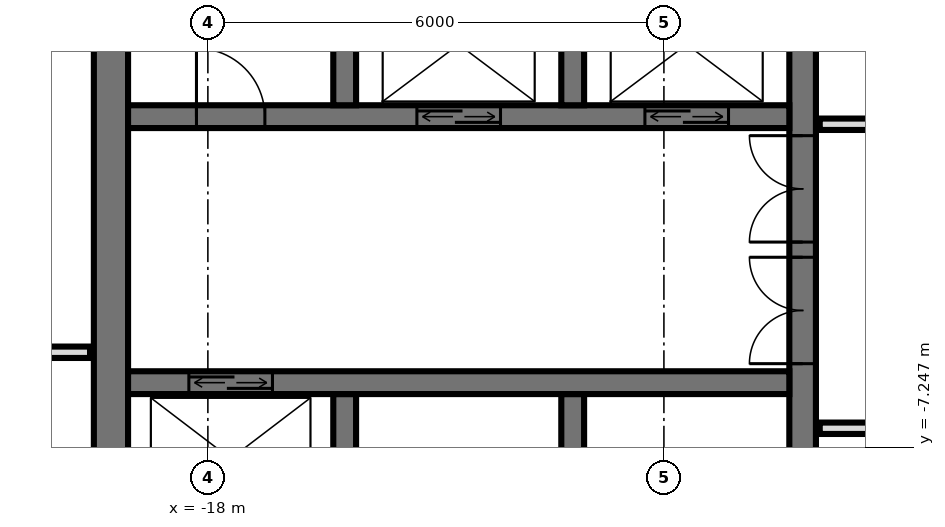
"""IFC4 building model, lengths in metres.
Left out: names, types, materials, properties, quantities, classifications, styles, units other than length and angle.
Written with IfcOpenShell. Run it as: python <this file> out.ifc"""

import sys

from ifc_helpers import new_model, si_unit, direction, frame, frame_2d, origin, place, context, subcontext, project, spatial, rectangle, extrude, element, fill, save


model = new_model("IFC4")
c1 = context("Model", 3, precision=1e-05, world=origin(), true_north=direction((0.0, 1.0)))
c2 = subcontext(c1, "Body", "Model", "MODEL_VIEW")
j1 = project(units=[si_unit("LENGTHUNIT", "METRE"), si_unit("PLANEANGLEUNIT", "RADIAN")], contexts=[c1])
p1 = place(None, origin())
s1 = spatial("IfcSite", under=j1, at=p1, CompositionType="ELEMENT")
p2 = place(p1, origin())
s2 = spatial("IfcBuilding", under=s1, at=p2, CompositionType="ELEMENT")
p3 = place(p2, frame((0.0, 0.0, 273.6)))
s3 = spatial("IfcBuildingStorey", under=s2, at=p3, CompositionType="ELEMENT", Elevation=273.6)
p4 = place(p3, frame((-10.175, -14.55, 0.0), z_axis=(0.0, 0.0, 1.0), x_axis=(0.0, 1.0, 0.0)))
e1 = element("IfcWall", 1, at=p4, inside=s3, PredefinedType="SHEAR", context=c2, shape_type="SweptSolid", body=[
    extrude(rectangle(XDim=14.1, YDim=0.35, at=frame_2d((7.05, 0.0))), origin(), (0.0, 0.0, 1.0), 3.5),
])
p5 = place(p4, frame((8.4, 0.0, 0.0)))
e2 = element("IfcOpeningElement", 2, at=p5, cuts=e1, PredefinedType="OPENING", context=c2, shape_type="SweptSolid", body=[
    extrude(rectangle(XDim=1.4, YDim=2.4, at=frame_2d((0.7, 1.2))), frame((0.0, 0.185, 0.0), z_axis=(0.0, -1.0, 0.0), x_axis=(1.0, 0.0, 0.0)), (0.0, 0.0, 1.0), 0.37),
])
p6 = place(p4, frame((10.0, 0.0, 0.0)))
e3 = element("IfcOpeningElement", 3, at=p6, cuts=e1, PredefinedType="OPENING", context=c2, shape_type="SweptSolid", body=[
    extrude(rectangle(XDim=1.4, YDim=2.4, at=frame_2d((0.7, 1.2))), frame((0.0, 0.185, 0.0), z_axis=(0.0, -1.0, 0.0), x_axis=(1.0, 0.0, 0.0)), (0.0, 0.0, 1.0), 0.37),
])
p7 = place(p4, frame((4.0, 0.0, 0.0)))
e4 = element("IfcOpeningElement", 4, at=p7, cuts=e1, PredefinedType="OPENING", context=c2, shape_type="SweptSolid", body=[
    extrude(rectangle(XDim=1.2, YDim=2.1, at=frame_2d((0.6, 1.05))), frame((0.0, 0.185, 0.0), z_axis=(0.0, -1.0, 0.0), x_axis=(1.0, 0.0, 0.0)), (0.0, 0.0, 1.0), 0.37),
])
p8 = place(p3, frame((-19.275, -14.55, 0.0), z_axis=(0.0, 0.0, 1.0), x_axis=(0.0, 1.0, 0.0)))
e5 = element("IfcWall", 5, at=p8, inside=s3, PredefinedType="SHEAR", context=c2, shape_type="SweptSolid", body=[
    extrude(rectangle(XDim=14.1, YDim=0.45, at=frame_2d((7.05, 0.0))), origin(), (0.0, 0.0, 1.0), 3.5),
])
p9 = place(p3, frame((-19.05, -2.9, 0.0), z_axis=(0.0, 0.0, 1.0), x_axis=(1.0, 0.0, 0.0)))
e6 = element("IfcWall", 6, at=p9, inside=s3, PredefinedType="SHEAR", context=c2, shape_type="SweptSolid", body=[
    extrude(rectangle(XDim=8.7, YDim=0.3, at=frame_2d((4.35, 0.0))), origin(), (0.0, 0.0, 1.0), 3.5),
])
p10 = place(p9, frame((6.8, 0.0, 0.0)))
e7 = element("IfcOpeningElement", 7, at=p10, cuts=e6, PredefinedType="OPENING", context=c2, shape_type="SweptSolid", body=[
    extrude(rectangle(XDim=1.1, YDim=2.1, at=frame_2d((0.55, 1.05))), frame((0.0, 0.16, 0.0), z_axis=(0.0, -1.0, 0.0), x_axis=(1.0, 0.0, 0.0)), (0.0, 0.0, 1.0), 0.32),
])
p11 = place(p9, frame((3.8, 0.0, 0.0)))
e8 = element("IfcOpeningElement", 8, at=p11, cuts=e6, PredefinedType="OPENING", context=c2, shape_type="SweptSolid", body=[
    extrude(rectangle(XDim=1.1, YDim=2.1, at=frame_2d((0.55, 1.05))), frame((0.0, 0.16, 0.0), z_axis=(0.0, -1.0, 0.0), x_axis=(1.0, 0.0, 0.0)), (0.0, 0.0, 1.0), 0.32),
])
p12 = place(p9, frame((0.9, 0.0, 0.0)))
e9 = element("IfcOpeningElement", 9, at=p12, cuts=e6, PredefinedType="OPENING", context=c2, shape_type="SweptSolid", body=[
    extrude(rectangle(XDim=0.9, YDim=2.1, at=frame_2d((0.45, 1.05))), frame((0.0, 0.16, 0.0), z_axis=(0.0, -1.0, 0.0), x_axis=(1.0, 0.0, 0.0)), (0.0, 0.0, 1.0), 0.32),
])
p13 = place(p3, frame((-19.05, -6.4, 0.0), z_axis=(0.0, 0.0, 1.0), x_axis=(1.0, 0.0, 0.0)))
e10 = element("IfcWall", 10, at=p13, inside=s3, PredefinedType="SHEAR", context=c2, shape_type="SweptSolid", body=[
    extrude(rectangle(XDim=8.7, YDim=0.3, at=frame_2d((4.35, 0.0))), origin(), (0.0, 0.0, 1.0), 3.5),
])
p14 = place(p13, frame((0.8, 0.0, 0.0)))
e11 = element("IfcOpeningElement", 11, at=p14, cuts=e10, PredefinedType="OPENING", context=c2, shape_type="SweptSolid", body=[
    extrude(rectangle(XDim=1.1, YDim=2.1, at=frame_2d((0.55, 1.05))), frame((0.0, 0.16, 0.0), z_axis=(0.0, -1.0, 0.0), x_axis=(1.0, 0.0, 0.0)), (0.0, 0.0, 1.0), 0.32),
])
for number, where, z_axis, x_axis in (
    (12, (-13.2, -2.75, 0.0), (0.0, 0.0, 1.0), (0.0, 1.0, 0.0)),
    (13, (-13.2, -8.85, 0.0), (0.0, 0.0, 1.0), (0.0, 1.0, 0.0)),
    (14, (-16.2, -2.75, 0.0), (0.0, 0.0, 1.0), (0.0, 1.0, 0.0)),
    (15, (-16.2, -8.85, 0.0), (0.0, 0.0, 1.0), (0.0, 1.0, 0.0)),
):
    element("IfcWall", number, at=place(p3, frame(where, z_axis=z_axis, x_axis=x_axis)), inside=s3, PredefinedType="SHEAR", context=c2, shape_type="SweptSolid", body=[
        extrude(rectangle(XDim=2.3, YDim=0.3, at=frame_2d((1.15, 0.0))), origin(), (0.0, 0.0, 1.0), 3.5),
    ])
p15 = place(p3, frame((-9.95, -7.0, 0.0), z_axis=(0.0, 0.0, 1.0), x_axis=(1.0, 0.0, 0.0)))
e16 = element("IfcWall", 16, at=p15, inside=s3, PredefinedType="PARTITIONING", context=c2, shape_type="SweptSolid", body=[
    extrude(rectangle(XDim=19.9, YDim=0.15, at=frame_2d((9.95, 0.0))), origin(), (0.0, 0.0, 1.0), 3.22),
])
p16 = place(p15, frame((9.45, 0.0, 0.0)))
e17 = element("IfcOpeningElement", 17, at=p16, cuts=e16, PredefinedType="OPENING", context=c2, shape_type="SweptSolid", body=[
    extrude(rectangle(XDim=1.0, YDim=2.1, at=frame_2d((0.5, 1.05))), frame((0.0, 0.085, 0.0), z_axis=(0.0, -1.0, 0.0), x_axis=(1.0, 0.0, 0.0)), (0.0, 0.0, 1.0), 0.17),
])
p17 = place(p15, frame((3.45, 0.0, 0.0)))
e18 = element("IfcOpeningElement", 18, at=p17, cuts=e16, PredefinedType="OPENING", context=c2, shape_type="SweptSolid", body=[
    extrude(rectangle(XDim=1.0, YDim=2.1, at=frame_2d((0.5, 1.05))), frame((0.0, 0.085, 0.0), z_axis=(0.0, -1.0, 0.0), x_axis=(1.0, 0.0, 0.0)), (0.0, 0.0, 1.0), 0.17),
])
p18 = place(p3, frame((-22.92, -6.0, 0.0), z_axis=(0.0, 0.0, 1.0), x_axis=(1.0, 0.0, 0.0)))
e19 = element("IfcWall", 19, at=p18, inside=s3, PredefinedType="PARTITIONING", context=c2, shape_type="SweptSolid", body=[
    extrude(rectangle(XDim=3.37, YDim=0.15, at=frame_2d((1.685, 0.0))), origin(), (0.0, 0.0, 1.0), 3.22),
])
p19 = place(p18, frame((1.17, 0.0, 0.0)))
e20 = element("IfcOpeningElement", 20, at=p19, cuts=e19, PredefinedType="OPENING", context=c2, shape_type="SweptSolid", body=[
    extrude(rectangle(XDim=0.9, YDim=2.1, at=frame_2d((0.45, 1.05))), frame((0.0, 0.085, 0.0), z_axis=(0.0, -1.0, 0.0), x_axis=(1.0, 0.0, 0.0)), (0.0, 0.0, 1.0), 0.17),
])
p20 = place(p3, frame((-9.95, -3.0, 0.0), z_axis=(0.0, 0.0, 1.0), x_axis=(1.0, 0.0, 0.0)))
e21 = element("IfcWall", 21, at=p20, inside=s3, PredefinedType="PARTITIONING", context=c2, shape_type="SweptSolid", body=[
    extrude(rectangle(XDim=19.9, YDim=0.15, at=frame_2d((9.95, 0.0))), origin(), (0.0, 0.0, 1.0), 3.22),
])
p21 = place(p20, frame((4.2, 0.0, 0.0)))
e22 = element("IfcOpeningElement", 22, at=p21, cuts=e21, PredefinedType="OPENING", context=c2, shape_type="SweptSolid", body=[
    extrude(rectangle(XDim=1.0, YDim=2.1, at=frame_2d((0.5, 1.05))), frame((0.0, 0.085, 0.0), z_axis=(0.0, -1.0, 0.0), x_axis=(1.0, 0.0, 0.0)), (0.0, 0.0, 1.0), 0.17),
])
p22 = place(p20, frame((11.45, 0.0, 0.0)))
e23 = element("IfcOpeningElement", 23, at=p22, cuts=e21, PredefinedType="OPENING", context=c2, shape_type="SweptSolid", body=[
    extrude(rectangle(XDim=1.0, YDim=2.1, at=frame_2d((0.5, 1.05))), frame((0.0, 0.085, 0.0), z_axis=(0.0, -1.0, 0.0), x_axis=(1.0, 0.0, 0.0)), (0.0, 0.0, 1.0), 0.17),
])
p23 = place(p20, frame((15.45, 0.0, 0.0)))
e24 = element("IfcOpeningElement", 24, at=p23, cuts=e21, PredefinedType="OPENING", context=c2, shape_type="SweptSolid", body=[
    extrude(rectangle(XDim=1.0, YDim=2.1, at=frame_2d((0.5, 1.05))), frame((0.0, 0.085, 0.0), z_axis=(0.0, -1.0, 0.0), x_axis=(1.0, 0.0, 0.0)), (0.0, 0.0, 1.0), 0.17),
])
p24 = place(p20, frame((18.2, 0.0, 0.0)))
e25 = element("IfcOpeningElement", 25, at=p24, cuts=e21, PredefinedType="OPENING", context=c2, shape_type="SweptSolid", body=[
    extrude(rectangle(XDim=1.0, YDim=2.1, at=frame_2d((0.5, 1.05))), frame((0.0, 0.085, 0.0), z_axis=(0.0, -1.0, 0.0), x_axis=(1.0, 0.0, 0.0)), (0.0, 0.0, 1.0), 0.17),
])
p25 = place(p10, origin())
e26 = element("IfcDoor", 26, at=p25, inside=s3, OperationType="DOUBLE_DOOR_SLIDING", PredefinedType="USERDEFINED", context=c2, shape_type="SweptSolid", body=[
    extrude(rectangle(XDim=1.1, YDim=2.1, at=frame_2d((0.55, 1.05))), frame((0.0, 0.025, 0.0), z_axis=(0.0, -1.0, 0.0), x_axis=(1.0, 0.0, 0.0)), (0.0, 0.0, 1.0), 0.05),
])
fill(e7, e26)
p26 = place(p11, origin())
e27 = element("IfcDoor", 27, at=p26, inside=s3, OperationType="DOUBLE_DOOR_SLIDING", PredefinedType="USERDEFINED", context=c2, shape_type="SweptSolid", body=[
    extrude(rectangle(XDim=1.1, YDim=2.1, at=frame_2d((0.55, 1.05))), frame((0.0, 0.025, 0.0), z_axis=(0.0, -1.0, 0.0), x_axis=(1.0, 0.0, 0.0)), (0.0, 0.0, 1.0), 0.05),
])
fill(e8, e27)
p27 = place(p14, origin())
e28 = element("IfcDoor", 28, at=p27, inside=s3, OperationType="DOUBLE_DOOR_SLIDING", PredefinedType="USERDEFINED", context=c2, shape_type="SweptSolid", body=[
    extrude(rectangle(XDim=1.1, YDim=2.1, at=frame_2d((0.55, 1.05))), frame((0.0, 0.025, 0.0), z_axis=(0.0, -1.0, 0.0), x_axis=(1.0, 0.0, 0.0)), (0.0, 0.0, 1.0), 0.05),
])
fill(e11, e28)
p28 = place(p5, origin())
e29 = element("IfcDoor", 29, at=p28, inside=s3, OperationType="DOUBLE_DOOR_SINGLE_SWING", PredefinedType="DOOR", context=c2, shape_type="SweptSolid", body=[
    extrude(rectangle(XDim=1.4, YDim=2.4, at=frame_2d((0.7, 1.2))), frame((0.0, 0.025, 0.0), z_axis=(0.0, -1.0, 0.0), x_axis=(1.0, 0.0, 0.0)), (0.0, 0.0, 1.0), 0.05),
])
fill(e2, e29)
p29 = place(p6, origin())
e30 = element("IfcDoor", 30, at=p29, inside=s3, OperationType="DOUBLE_DOOR_SINGLE_SWING", PredefinedType="DOOR", context=c2, shape_type="SweptSolid", body=[
    extrude(rectangle(XDim=1.4, YDim=2.4, at=frame_2d((0.7, 1.2))), frame((0.0, 0.025, 0.0), z_axis=(0.0, -1.0, 0.0), x_axis=(1.0, 0.0, 0.0)), (0.0, 0.0, 1.0), 0.05),
])
fill(e3, e30)
p30 = place(p12, origin())
e31 = element("IfcDoor", 31, at=p30, inside=s3, OperationType="SINGLE_SWING_RIGHT", PredefinedType="DOOR", context=c2, shape_type="SweptSolid", body=[
    extrude(rectangle(XDim=0.9, YDim=2.1, at=frame_2d((0.45, 1.05))), frame((0.0, 0.025, 0.0), z_axis=(0.0, -1.0, 0.0), x_axis=(1.0, 0.0, 0.0)), (0.0, 0.0, 1.0), 0.05),
])
fill(e9, e31)
save(model, sys.argv[1])
